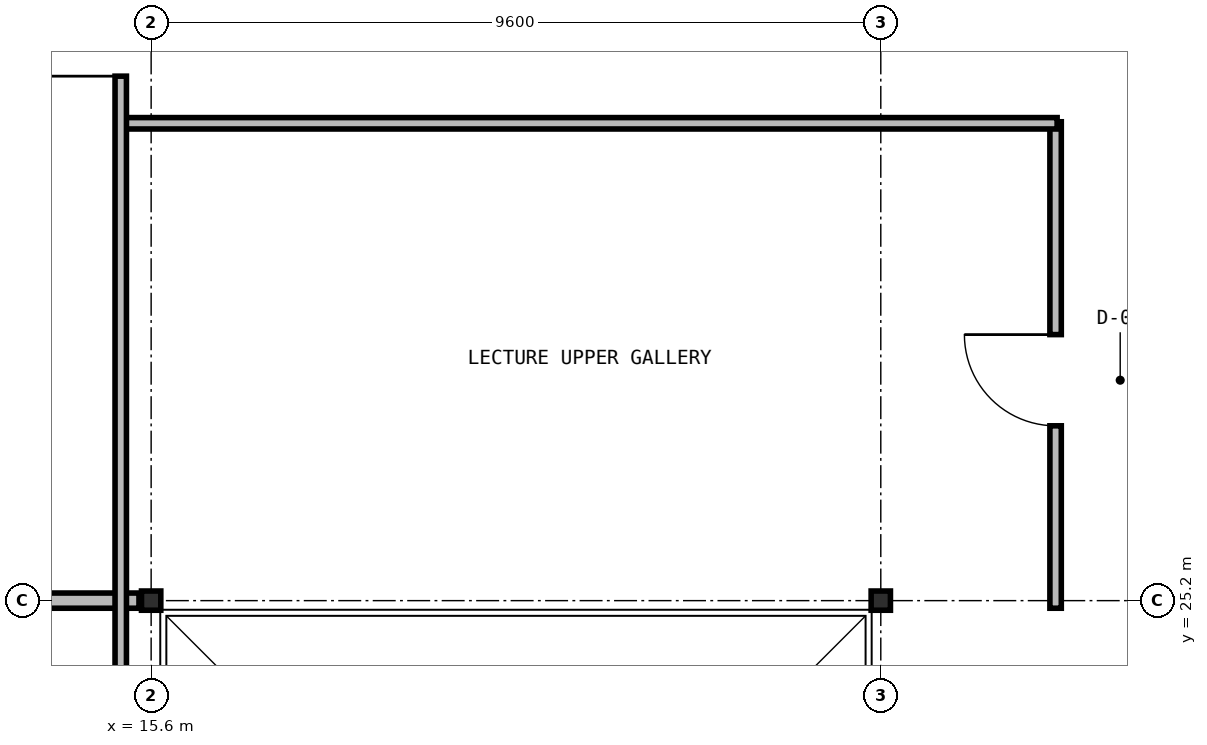
"""IFC4 building model, lengths in metres.
Left out: names, types, materials, properties, quantities, classifications, styles, units other than length and angle.
Written with IfcOpenShell. Run it as: python <this file> out.ifc"""

import sys

from ifc_helpers import new_model, si_unit, direction, frame, frame_2d, origin, origin_2d, place, context, subcontext, project, spatial, rectangle, i_section, extrude, element, fill, save


model = new_model("IFC4")
c1 = context("Model", 3, precision=1e-05, world=origin(), true_north=direction((0.0, 1.0)))
c2 = subcontext(c1, "Body", "Model", "MODEL_VIEW")
j1 = project(units=[si_unit("LENGTHUNIT", "METRE"), si_unit("PLANEANGLEUNIT", "RADIAN")], contexts=[c1])
p1 = place(None, origin())
s1 = spatial("IfcSite", under=j1, at=p1, CompositionType="ELEMENT")
p2 = place(p1, origin())
s2 = spatial("IfcBuilding", under=s1, at=p2, CompositionType="ELEMENT")
p3 = place(p2, frame((0.0, 0.0, 5.25)))
s3 = spatial("IfcBuildingStorey", under=s2, at=p3, CompositionType="ELEMENT", Elevation=5.25)
for number, where, z_axis, x_axis in (
    (1, (15.6, 25.2, 0.0), (0.0, 0.0, 1.0), (1.0, 0.0, 0.0)),
    (2, (25.2, 25.2, 0.0), (0.0, 0.0, 1.0), (1.0, 0.0, 0.0)),
):
    element("IfcColumn", number, at=place(p3, frame(where, z_axis=z_axis, x_axis=x_axis)), inside=s3, PredefinedType="COLUMN", context=c2, shape_type="SweptSolid", body=[
        extrude(i_section(OverallWidth=0.254, OverallDepth=0.253, WebThickness=0.009, FlangeThickness=0.014, at=origin_2d()), origin(), (0.0, 0.0, 1.0), 4.55),
    ])
p4 = place(p3, frame((6.16, 25.2, 0.0), z_axis=(0.0, 0.0, 1.0), x_axis=(1.0, 0.0, 0.0)))
e3 = element("IfcWall", 3, at=p4, inside=s3, PredefinedType="SOLIDWALL", context=c2, shape_type="SweptSolid", body=[
    extrude(rectangle(XDim=9.28, YDim=0.2, at=frame_2d((4.64, 0.0))), origin(), (0.0, 0.0, 1.0), 3.815),
])
p5 = place(p3, frame((27.5, 25.1, 0.0), z_axis=(0.0, 0.0, 1.0), x_axis=(0.0, 1.0, 0.0)))
e4 = element("IfcWall", 4, at=p5, inside=s3, PredefinedType="PARTITIONING", context=c2, shape_type="SweptSolid", body=[
    extrude(rectangle(XDim=6.4, YDim=0.15, at=frame_2d((3.2, 0.0))), origin(), (0.0, 0.0, 1.0), 4.23),
])
p6 = place(p5, frame((2.4, 0.0, 0.0)))
e5 = element("IfcOpeningElement", 5, at=p6, cuts=e4, PredefinedType="OPENING", context=c2, shape_type="SweptSolid", body=[
    extrude(rectangle(XDim=1.2, YDim=2.2, at=frame_2d((0.6, 1.1))), frame((0.0, 0.085, 0.0), z_axis=(0.0, -1.0, 0.0), x_axis=(1.0, 0.0, 0.0)), (0.0, 0.0, 1.0), 0.17),
])
p7 = place(p3, frame((15.2, 31.48, 0.0), z_axis=(0.0, 0.0, 1.0), x_axis=(1.0, 0.0, 0.0)))
e6 = element("IfcWall", 6, at=p7, inside=s3, PredefinedType="PARTITIONING", context=c2, shape_type="SweptSolid", body=[
    extrude(rectangle(XDim=12.32, YDim=0.15, at=frame_2d((6.16, 0.0))), origin(), (0.0, 0.0, 1.0), 4.23),
])
p8 = place(p3, frame((15.2, 13.9, 0.0), z_axis=(0.0, 0.0, 1.0), x_axis=(0.0, 1.0, 0.0)))
e7 = element("IfcWall", 7, at=p8, inside=s3, PredefinedType="PARTITIONING", context=c2, shape_type="SweptSolid", body=[
    extrude(rectangle(XDim=20.74, YDim=0.15, at=frame_2d((10.37, 0.0))), origin(), (0.0, 0.0, 1.0), 4.23),
])
p9 = place(p8, frame((18.2, 0.0, 0.0)))
e8 = element("IfcOpeningElement", 8, at=p9, cuts=e7, PredefinedType="OPENING", context=c2, shape_type="SweptSolid", body=[
    extrude(rectangle(XDim=1.1, YDim=2.2, at=frame_2d((0.55, 1.1))), frame((0.0, 0.085, 0.0), z_axis=(0.0, -1.0, 0.0), x_axis=(1.0, 0.0, 0.0)), (0.0, 0.0, 1.0), 0.17),
])
p10 = place(p6, origin())
e9 = element("IfcDoor", 9, at=p10, inside=s3, OperationType="SINGLE_SWING_RIGHT", PredefinedType="DOOR", context=c2, shape_type="SweptSolid", body=[
    extrude(rectangle(XDim=1.2, YDim=2.2, at=frame_2d((0.6, 1.1))), frame((0.0, 0.025, 0.0), z_axis=(0.0, -1.0, 0.0), x_axis=(1.0, 0.0, 0.0)), (0.0, 0.0, 1.0), 0.05),
])
fill(e5, e9)
p11 = place(p9, origin())
e10 = element("IfcDoor", 10, at=p11, inside=s3, OperationType="SINGLE_SWING_LEFT", PredefinedType="DOOR", context=c2, shape_type="SweptSolid", body=[
    extrude(rectangle(XDim=1.1, YDim=2.2, at=frame_2d((0.55, 1.1))), frame((0.0, 0.025, 0.0), z_axis=(0.0, -1.0, 0.0), x_axis=(1.0, 0.0, 0.0)), (0.0, 0.0, 1.0), 0.05),
])
fill(e8, e10)
save(model, sys.argv[1])
